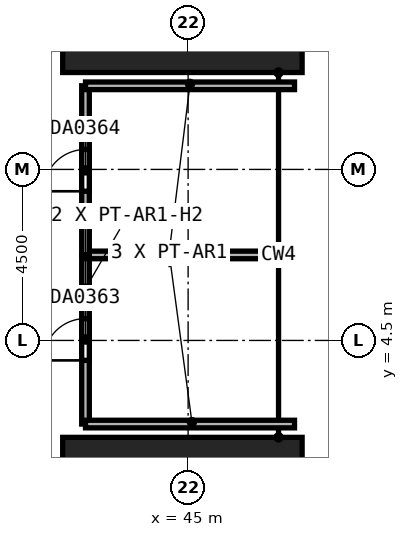
"""IFC4 building model, lengths in metres.
Left out: names, types, materials, properties, quantities, classifications, styles, units other than length and angle.
Written with IfcOpenShell. Run it as: python <this file> out.ifc"""

import sys

from ifc_helpers import new_model, si_unit, direction, frame, frame_2d, origin, origin_2d, place, context, subcontext, project, spatial, rectangle, extrude, element, fill, save


model = new_model("IFC4")
c1 = context("Model", 3, precision=1e-05, world=origin(), true_north=direction((0.0, 1.0)))
c2 = subcontext(c1, "Body", "Model", "MODEL_VIEW")
j1 = project(units=[si_unit("LENGTHUNIT", "METRE"), si_unit("PLANEANGLEUNIT", "RADIAN")], contexts=[c1])
p1 = place(None, origin())
s1 = spatial("IfcSite", under=j1, at=p1, CompositionType="ELEMENT")
p2 = place(p1, origin())
s2 = spatial("IfcBuilding", under=s1, at=p2, CompositionType="ELEMENT")
p3 = place(p2, frame((0.0, 0.0, 19.0)))
s3 = spatial("IfcBuildingStorey", under=s2, at=p3, CompositionType="ELEMENT", Elevation=19.0)
for number, where, z_axis, x_axis in (
    (1, (44.85, 0.0, 0.0), (0.0, 0.0, 1.0), (0.0, 1.0, 0.0)),
    (2, (44.85, 13.5, 0.0), (0.0, 0.0, 1.0), (0.0, 1.0, 0.0)),
):
    element("IfcColumn", number, at=place(p3, frame(where, z_axis=z_axis, x_axis=x_axis)), inside=s3, PredefinedType="COLUMN", context=c2, shape_type="SweptSolid", body=[
        extrude(rectangle(XDim=3.9, YDim=6.3, at=origin_2d()), origin(), (0.0, 0.0, 1.0), 6.0),
    ])
p4 = place(p3, frame((42.3, 2.3, 0.0), z_axis=(0.0, 0.0, 1.0), x_axis=(0.0, 1.0, 0.0)))
e3 = element("IfcWall", 3, at=p4, inside=s3, PredefinedType="PARTITIONING", context=c2, shape_type="SweptSolid", body=[
    extrude(rectangle(XDim=4.45, YDim=0.2, at=frame_2d((2.225, 0.0))), origin(), (0.0, 0.0, 1.0), 4.5),
])
p5 = place(p4, frame((1.675, 0.0, 0.0)))
e4 = element("IfcOpeningElement", 4, at=p5, cuts=e3, PredefinedType="OPENING", context=c2, shape_type="SweptSolid", body=[
    extrude(rectangle(XDim=1.1, YDim=2.4, at=frame_2d((0.55, 1.2))), frame((0.0, 0.1, 0.0), z_axis=(0.0, -1.0, 0.0), x_axis=(1.0, 0.0, 0.0)), (0.0, 0.0, 1.0), 0.2),
])
for number, where, z_axis, x_axis in (
    (5, (42.3, 2.3, 0.0), (0.0, 0.0, 1.0), (1.0, 0.0, 0.0)),
    (6, (42.3, 6.75, 0.0), (0.0, 0.0, 1.0), (1.0, 0.0, 0.0)),
):
    element("IfcWall", number, at=place(p3, frame(where, z_axis=z_axis, x_axis=x_axis)), inside=s3, PredefinedType="PARTITIONING", context=c2, shape_type="SweptSolid", body=[
        extrude(rectangle(XDim=5.5, YDim=0.2, at=frame_2d((2.75, 0.0))), origin(), (0.0, 0.0, 1.0), 5.7),
    ])
p6 = place(p3, frame((42.3, 6.75, 0.0), z_axis=(0.0, 0.0, 1.0), x_axis=(0.0, 1.0, 0.0)))
e7 = element("IfcWall", 7, at=p6, inside=s3, PredefinedType="PARTITIONING", context=c2, shape_type="SweptSolid", body=[
    extrude(rectangle(XDim=4.45, YDim=0.2, at=frame_2d((2.225, 0.0))), origin(), (0.0, 0.0, 1.0), 4.5),
])
p7 = place(p6, frame((1.675, 0.0, 0.0)))
e8 = element("IfcOpeningElement", 8, at=p7, cuts=e7, PredefinedType="OPENING", context=c2, shape_type="SweptSolid", body=[
    extrude(rectangle(XDim=1.1, YDim=2.4, at=frame_2d((0.55, 1.2))), frame((0.0, 0.1, 0.0), z_axis=(0.0, -1.0, 0.0), x_axis=(1.0, 0.0, 0.0)), (0.0, 0.0, 1.0), 0.2),
])
p8 = place(p3, frame((42.3, 11.2, 0.0), z_axis=(0.0, 0.0, 1.0), x_axis=(1.0, 0.0, 0.0)))
e9 = element("IfcWall", 9, at=p8, inside=s3, PredefinedType="PARTITIONING", context=c2, shape_type="SweptSolid", body=[
    extrude(rectangle(XDim=5.5, YDim=0.2, at=frame_2d((2.75, 0.0))), origin(), (0.0, 0.0, 1.0), 5.7),
])
p9 = place(p5, origin())
e10 = element("IfcDoor", 10, at=p9, inside=s3, OperationType="DOUBLE_DOOR_SINGLE_SWING", PredefinedType="DOOR", context=c2, shape_type="SweptSolid", body=[
    extrude(rectangle(XDim=1.1, YDim=2.4, at=frame_2d((0.55, 1.2))), frame((0.0, 0.025, 0.0), z_axis=(0.0, -1.0, 0.0), x_axis=(1.0, 0.0, 0.0)), (0.0, 0.0, 1.0), 0.05),
])
fill(e4, e10)
p10 = place(p7, origin())
e11 = element("IfcDoor", 11, at=p10, inside=s3, OperationType="DOUBLE_DOOR_SINGLE_SWING", PredefinedType="DOOR", context=c2, shape_type="SweptSolid", body=[
    extrude(rectangle(XDim=1.1, YDim=2.4, at=frame_2d((0.55, 1.2))), frame((0.0, 0.025, 0.0), z_axis=(0.0, -1.0, 0.0), x_axis=(1.0, 0.0, 0.0)), (0.0, 0.0, 1.0), 0.05),
])
fill(e8, e11)
save(model, sys.argv[1])
